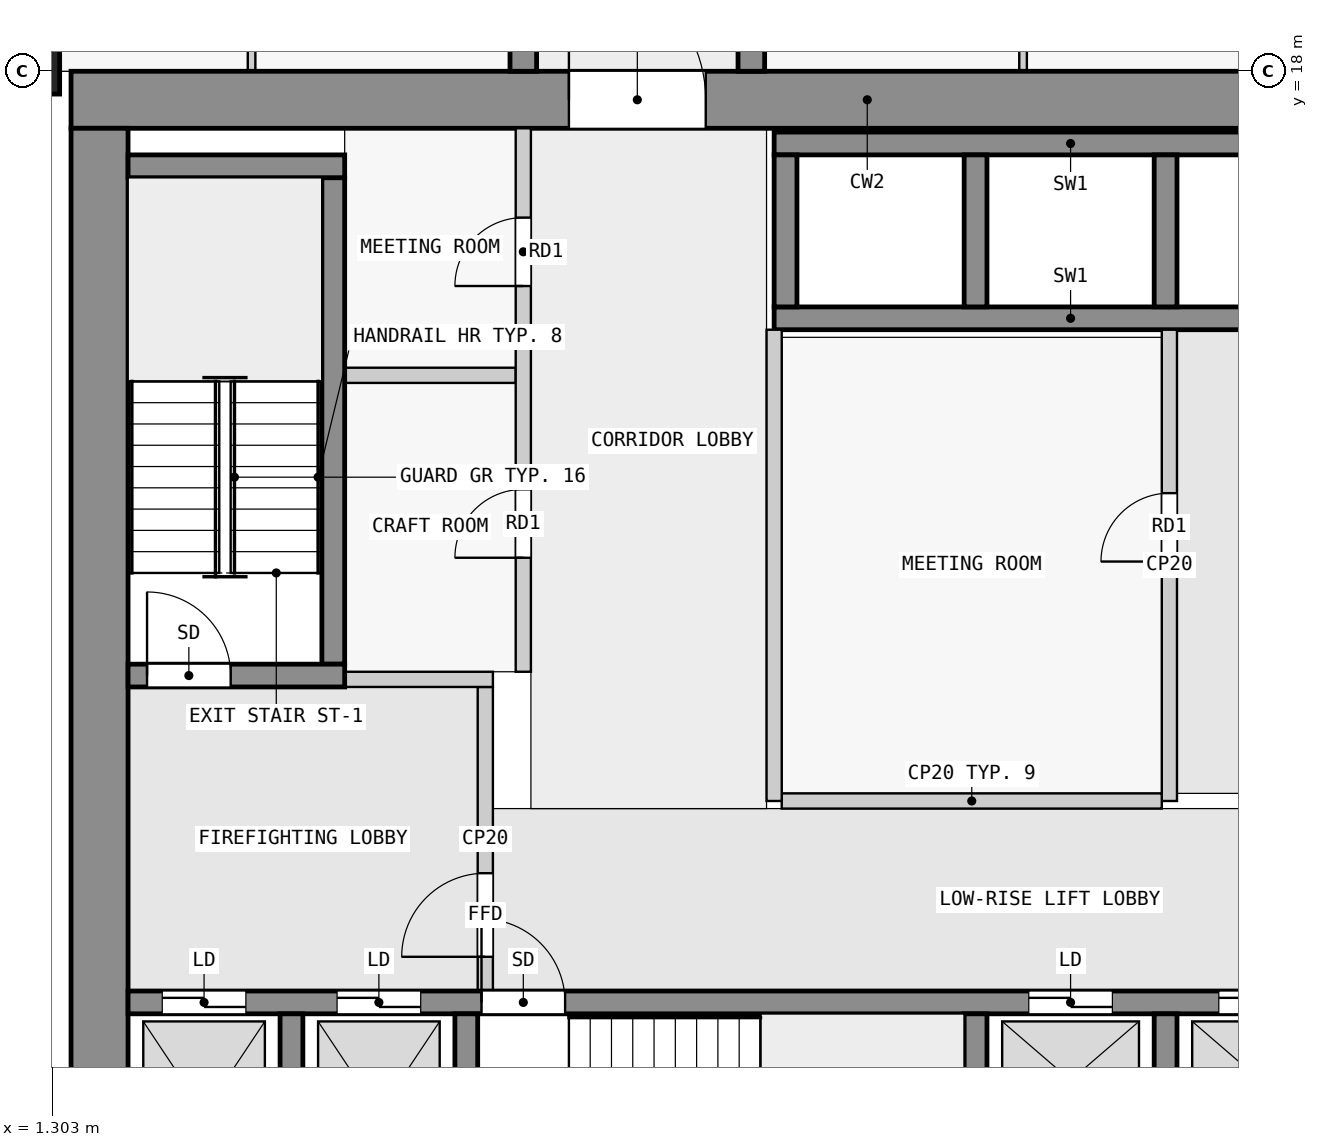
"""IFC4 building model, lengths in metres.
Left out: names, types, materials, properties, quantities, classifications, styles, units other than length and angle.
Written with IfcOpenShell. Run it as: python <this file> out.ifc"""

import sys

from ifc_helpers import new_model, si_unit, direction, frame, frame_2d, origin, origin_2d, place, context, subcontext, project, spatial, rectangle, extrude, element, fill, save


model = new_model("IFC4")
c1 = context("Model", 3, precision=1e-05, world=origin(), true_north=direction((0.0, 1.0)))
c2 = subcontext(c1, "Body", "Model", "MODEL_VIEW")
j1 = project(units=[si_unit("LENGTHUNIT", "METRE"), si_unit("PLANEANGLEUNIT", "RADIAN")], contexts=[c1])
p1 = place(None, origin())
s1 = spatial("IfcSite", under=j1, at=p1, CompositionType="ELEMENT")
p2 = place(p1, origin())
s2 = spatial("IfcBuilding", under=s1, at=p2, CompositionType="ELEMENT")
p3 = place(p2, frame((0.0, 0.0, 47.8)))
s3 = spatial("IfcBuildingStorey", under=s2, at=p3, CompositionType="ELEMENT", Elevation=47.8)
p4 = place(p3, frame((0.7, 18.0, 0.0), z_axis=(0.0, 0.0, 1.0), x_axis=(0.0, 1.0, 0.0)))
e1 = element("IfcColumn", 1, at=p4, inside=s3, PredefinedType="COLUMN", context=c2, shape_type="SweptSolid", body=[
    extrude(rectangle(XDim=0.6, YDim=1.4, at=origin_2d()), origin(), (0.0, 0.0, 1.0), 3.5),
])
p5 = place(p3, frame((1.55, 17.625, 0.0), z_axis=(0.0, 0.0, 1.0), x_axis=(1.0, 0.0, 0.0)))
e2 = element("IfcWall", 2, at=p5, inside=s3, PredefinedType="SHEAR", context=c2, shape_type="SweptSolid", body=[
    extrude(rectangle(XDim=20.95, YDim=0.75, at=frame_2d((10.475, 0.0))), origin(), (0.0, 0.0, 1.0), 3.25),
])
p6 = place(p5, frame((6.55, 0.0, 0.0)))
e3 = element("IfcOpeningElement", 3, at=p6, cuts=e2, PredefinedType="OPENING", context=c2, shape_type="SweptSolid", body=[
    extrude(rectangle(XDim=1.8, YDim=2.1, at=frame_2d((0.9, 1.05))), frame((0.0, 0.385, 0.0), z_axis=(0.0, -1.0, 0.0), x_axis=(1.0, 0.0, 0.0)), (0.0, 0.0, 1.0), 0.77),
])
p7 = place(p3, frame((1.925, 2.5, 0.0), z_axis=(0.0, 0.0, 1.0), x_axis=(0.0, 1.0, 0.0)))
e4 = element("IfcWall", 4, at=p7, inside=s3, PredefinedType="SHEAR", context=c2, shape_type="SweptSolid", body=[
    extrude(rectangle(XDim=14.75, YDim=0.75, at=frame_2d((7.375, 0.0))), origin(), (0.0, 0.0, 1.0), 3.25),
])
for number, where, z_axis, x_axis in (
    (5, (4.45, 2.8, 0.0), (0.0, 0.0, 1.0), (0.0, 1.0, 0.0)),
    (6, (6.75, 2.8, 0.0), (0.0, 0.0, 1.0), (0.0, 1.0, 0.0)),
    (7, (13.45, 2.8, 0.0), (0.0, 0.0, 1.0), (0.0, 1.0, 0.0)),
    (8, (15.95, 2.8, 0.0), (0.0, 0.0, 1.0), (0.0, 1.0, 0.0)),
):
    element("IfcWall", number, at=place(p3, frame(where, z_axis=z_axis, x_axis=x_axis)), inside=s3, PredefinedType="SHEAR", context=c2, shape_type="SweptSolid", body=[
        extrude(rectangle(XDim=2.8, YDim=0.3, at=frame_2d((1.4, 0.0))), origin(), (0.0, 0.0, 1.0), 3.25),
    ])
p8 = place(p3, frame((2.3, 5.75, 0.0), z_axis=(0.0, 0.0, 1.0), x_axis=(1.0, 0.0, 0.0)))
e9 = element("IfcWall", 9, at=p8, inside=s3, PredefinedType="SHEAR", context=c2, shape_type="SweptSolid", body=[
    extrude(rectangle(XDim=18.8, YDim=0.3, at=frame_2d((9.4, 0.0))), origin(), (0.0, 0.0, 1.0), 3.25),
])
p9 = place(p8, frame((4.65, 0.0, 0.0)))
e10 = element("IfcOpeningElement", 10, at=p9, cuts=e9, PredefinedType="OPENING", context=c2, shape_type="SweptSolid", body=[
    extrude(rectangle(XDim=1.1, YDim=2.1, at=frame_2d((0.55, 1.05))), frame((0.0, 0.16, 0.0), z_axis=(0.0, -1.0, 0.0), x_axis=(1.0, 0.0, 0.0)), (0.0, 0.0, 1.0), 0.32),
])
p10 = place(p8, frame((0.45, 0.0, 0.0)))
e11 = element("IfcOpeningElement", 11, at=p10, cuts=e9, PredefinedType="OPENING", context=c2, shape_type="SweptSolid", body=[
    extrude(rectangle(XDim=1.1, YDim=2.1, at=frame_2d((0.55, 1.05))), frame((0.0, 0.16, 0.0), z_axis=(0.0, -1.0, 0.0), x_axis=(1.0, 0.0, 0.0)), (0.0, 0.0, 1.0), 0.32),
])
p11 = place(p8, frame((2.75, 0.0, 0.0)))
e12 = element("IfcOpeningElement", 12, at=p11, cuts=e9, PredefinedType="OPENING", context=c2, shape_type="SweptSolid", body=[
    extrude(rectangle(XDim=1.1, YDim=2.1, at=frame_2d((0.55, 1.05))), frame((0.0, 0.16, 0.0), z_axis=(0.0, -1.0, 0.0), x_axis=(1.0, 0.0, 0.0)), (0.0, 0.0, 1.0), 0.32),
])
p12 = place(p8, frame((11.85, 0.0, 0.0)))
e13 = element("IfcOpeningElement", 13, at=p12, cuts=e9, PredefinedType="OPENING", context=c2, shape_type="SweptSolid", body=[
    extrude(rectangle(XDim=1.1, YDim=2.1, at=frame_2d((0.55, 1.05))), frame((0.0, 0.16, 0.0), z_axis=(0.0, -1.0, 0.0), x_axis=(1.0, 0.0, 0.0)), (0.0, 0.0, 1.0), 0.32),
])
p13 = place(p8, frame((14.35, 0.0, 0.0)))
e14 = element("IfcOpeningElement", 14, at=p13, cuts=e9, PredefinedType="OPENING", context=c2, shape_type="SweptSolid", body=[
    extrude(rectangle(XDim=1.1, YDim=2.1, at=frame_2d((0.55, 1.05))), frame((0.0, 0.16, 0.0), z_axis=(0.0, -1.0, 0.0), x_axis=(1.0, 0.0, 0.0)), (0.0, 0.0, 1.0), 0.32),
])
p14 = place(p8, frame((16.85, 0.0, 0.0)))
e15 = element("IfcOpeningElement", 15, at=p14, cuts=e9, PredefinedType="OPENING", context=c2, shape_type="SweptSolid", body=[
    extrude(rectangle(XDim=1.1, YDim=2.1, at=frame_2d((0.55, 1.05))), frame((0.0, 0.16, 0.0), z_axis=(0.0, -1.0, 0.0), x_axis=(1.0, 0.0, 0.0)), (0.0, 0.0, 1.0), 0.32),
])
p15 = place(p3, frame((2.3, 10.05, 0.0), z_axis=(0.0, 0.0, 1.0), x_axis=(1.0, 0.0, 0.0)))
e16 = element("IfcWall", 16, at=p15, inside=s3, PredefinedType="SHEAR", context=c2, shape_type="SweptSolid", body=[
    extrude(rectangle(XDim=2.85, YDim=0.3, at=frame_2d((1.425, 0.0))), origin(), (0.0, 0.0, 1.0), 3.25),
])
p16 = place(p15, frame((0.25, 0.0, 0.0)))
e17 = element("IfcOpeningElement", 17, at=p16, cuts=e16, PredefinedType="OPENING", context=c2, shape_type="SweptSolid", body=[
    extrude(rectangle(XDim=1.1, YDim=2.1, at=frame_2d((0.55, 1.05))), frame((0.0, 0.16, 0.0), z_axis=(0.0, -1.0, 0.0), x_axis=(1.0, 0.0, 0.0)), (0.0, 0.0, 1.0), 0.32),
])
p17 = place(p3, frame((5.0, 10.2, 0.0), z_axis=(0.0, 0.0, 1.0), x_axis=(0.0, 1.0, 0.0)))
e18 = element("IfcWall", 18, at=p17, inside=s3, PredefinedType="SHEAR", context=c2, shape_type="SweptSolid", body=[
    extrude(rectangle(XDim=6.4, YDim=0.3, at=frame_2d((3.2, 0.0))), origin(), (0.0, 0.0, 1.0), 3.25),
])
p18 = place(p3, frame((2.3, 16.75, 0.0), z_axis=(0.0, 0.0, 1.0), x_axis=(1.0, 0.0, 0.0)))
e19 = element("IfcWall", 19, at=p18, inside=s3, PredefinedType="SHEAR", context=c2, shape_type="SweptSolid", body=[
    extrude(rectangle(XDim=2.85, YDim=0.3, at=frame_2d((1.425, 0.0))), origin(), (0.0, 0.0, 1.0), 3.25),
])
for number, where, z_axis, x_axis in (
    (20, (10.8, 17.05, 0.0), (0.0, 0.0, 1.0), (1.0, 0.0, 0.0)),
    (21, (10.8, 14.75, 0.0), (0.0, 0.0, 1.0), (1.0, 0.0, 0.0)),
):
    element("IfcWall", number, at=place(p3, frame(where, z_axis=z_axis, x_axis=x_axis)), inside=s3, PredefinedType="SHEAR", context=c2, shape_type="SweptSolid", body=[
        extrude(rectangle(XDim=7.8, YDim=0.3, at=frame_2d((3.9, 0.0))), origin(), (0.0, 0.0, 1.0), 3.25),
    ])
for number, where, z_axis, x_axis in (
    (22, (10.95, 14.9, 0.0), (0.0, 0.0, 1.0), (0.0, 1.0, 0.0)),
    (23, (13.45, 14.9, 0.0), (0.0, 0.0, 1.0), (0.0, 1.0, 0.0)),
    (24, (15.95, 14.9, 0.0), (0.0, 0.0, 1.0), (0.0, 1.0, 0.0)),
):
    element("IfcWall", number, at=place(p3, frame(where, z_axis=z_axis, x_axis=x_axis)), inside=s3, PredefinedType="SHEAR", context=c2, shape_type="SweptSolid", body=[
        extrude(rectangle(XDim=2.0, YDim=0.3, at=frame_2d((1.0, 0.0))), origin(), (0.0, 0.0, 1.0), 3.25),
    ])
p19 = place(p3, frame((7.5, 18.0, 0.0), z_axis=(0.0, 0.0, 1.0), x_axis=(0.0, 1.0, 0.0)))
e25 = element("IfcWall", 25, at=p19, inside=s3, PredefinedType="SHEAR", context=c2, shape_type="SweptSolid", body=[
    extrude(rectangle(XDim=27.0, YDim=0.35, at=frame_2d((13.5, 0.0))), origin(), (0.0, 0.0, 1.0), 3.25),
])
p20 = place(p19, frame((4.75, 0.0, 0.0)))
e26 = element("IfcOpeningElement", 26, at=p20, cuts=e25, PredefinedType="OPENING", context=c2, shape_type="SweptSolid", body=[
    extrude(rectangle(XDim=1.0, YDim=2.1, at=frame_2d((0.5, 1.05))), frame((0.0, 0.185, 0.0), z_axis=(0.0, -1.0, 0.0), x_axis=(1.0, 0.0, 0.0)), (0.0, 0.0, 1.0), 0.37),
])
p21 = place(p19, frame((15.25, 0.0, 0.0)))
e27 = element("IfcOpeningElement", 27, at=p21, cuts=e25, PredefinedType="OPENING", context=c2, shape_type="SweptSolid", body=[
    extrude(rectangle(XDim=1.0, YDim=2.1, at=frame_2d((0.5, 1.05))), frame((0.0, 0.185, 0.0), z_axis=(0.0, -1.0, 0.0), x_axis=(1.0, 0.0, 0.0)), (0.0, 0.0, 1.0), 0.37),
])
p22 = place(p19, frame((19.75, 0.0, 0.0)))
e28 = element("IfcOpeningElement", 28, at=p22, cuts=e25, PredefinedType="OPENING", context=c2, shape_type="SweptSolid", body=[
    extrude(rectangle(XDim=1.0, YDim=2.1, at=frame_2d((0.5, 1.05))), frame((0.0, 0.185, 0.0), z_axis=(0.0, -1.0, 0.0), x_axis=(1.0, 0.0, 0.0)), (0.0, 0.0, 1.0), 0.37),
])
p23 = place(p19, frame((23.25, 0.0, 0.0)))
e29 = element("IfcOpeningElement", 29, at=p23, cuts=e25, PredefinedType="OPENING", context=c2, shape_type="SweptSolid", body=[
    extrude(rectangle(XDim=0.9, YDim=2.1, at=frame_2d((0.45, 1.05))), frame((0.0, 0.185, 0.0), z_axis=(0.0, -1.0, 0.0), x_axis=(1.0, 0.0, 0.0)), (0.0, 0.0, 1.0), 0.37),
])
p24 = place(p19, frame((25.45, 0.0, 0.0)))
e30 = element("IfcOpeningElement", 30, at=p24, cuts=e25, PredefinedType="OPENING", context=c2, shape_type="SweptSolid", body=[
    extrude(rectangle(XDim=1.0, YDim=2.1, at=frame_2d((0.5, 1.05))), frame((0.0, 0.185, 0.0), z_axis=(0.0, -1.0, 0.0), x_axis=(1.0, 0.0, 0.0)), (0.0, 0.0, 1.0), 0.37),
])
p25 = place(p3, frame((10.5, 18.0, 0.0), z_axis=(0.0, 0.0, 1.0), x_axis=(0.0, 1.0, 0.0)))
e31 = element("IfcWall", 31, at=p25, inside=s3, PredefinedType="SHEAR", context=c2, shape_type="SweptSolid", body=[
    extrude(rectangle(XDim=27.0, YDim=0.35, at=frame_2d((13.5, 0.0))), origin(), (0.0, 0.0, 1.0), 3.25),
])
p26 = place(p25, frame((1.75, 0.0, 0.0)))
e32 = element("IfcOpeningElement", 32, at=p26, cuts=e31, PredefinedType="OPENING", context=c2, shape_type="SweptSolid", body=[
    extrude(rectangle(XDim=1.0, YDim=2.1, at=frame_2d((0.5, 1.05))), frame((0.0, 0.185, 0.0), z_axis=(0.0, -1.0, 0.0), x_axis=(1.0, 0.0, 0.0)), (0.0, 0.0, 1.0), 0.37),
])
p27 = place(p25, frame((6.25, 0.0, 0.0)))
e33 = element("IfcOpeningElement", 33, at=p27, cuts=e31, PredefinedType="OPENING", context=c2, shape_type="SweptSolid", body=[
    extrude(rectangle(XDim=1.0, YDim=2.1, at=frame_2d((0.5, 1.05))), frame((0.0, 0.185, 0.0), z_axis=(0.0, -1.0, 0.0), x_axis=(1.0, 0.0, 0.0)), (0.0, 0.0, 1.0), 0.37),
])
p28 = place(p25, frame((10.75, 0.0, 0.0)))
e34 = element("IfcOpeningElement", 34, at=p28, cuts=e31, PredefinedType="OPENING", context=c2, shape_type="SweptSolid", body=[
    extrude(rectangle(XDim=1.0, YDim=2.1, at=frame_2d((0.5, 1.05))), frame((0.0, 0.185, 0.0), z_axis=(0.0, -1.0, 0.0), x_axis=(1.0, 0.0, 0.0)), (0.0, 0.0, 1.0), 0.37),
])
p29 = place(p25, frame((15.25, 0.0, 0.0)))
e35 = element("IfcOpeningElement", 35, at=p29, cuts=e31, PredefinedType="OPENING", context=c2, shape_type="SweptSolid", body=[
    extrude(rectangle(XDim=1.0, YDim=2.1, at=frame_2d((0.5, 1.05))), frame((0.0, 0.185, 0.0), z_axis=(0.0, -1.0, 0.0), x_axis=(1.0, 0.0, 0.0)), (0.0, 0.0, 1.0), 0.37),
])
p30 = place(p25, frame((21.35, 0.0, 0.0)))
e36 = element("IfcOpeningElement", 36, at=p30, cuts=e31, PredefinedType="OPENING", context=c2, shape_type="SweptSolid", body=[
    extrude(rectangle(XDim=1.0, YDim=2.1, at=frame_2d((0.5, 1.05))), frame((0.0, 0.185, 0.0), z_axis=(0.0, -1.0, 0.0), x_axis=(1.0, 0.0, 0.0)), (0.0, 0.0, 1.0), 0.37),
])
p31 = place(p3, frame((7.0, 5.9, 0.0), z_axis=(0.0, 0.0, 1.0), x_axis=(0.0, 1.0, 0.0)))
e37 = element("IfcWall", 37, at=p31, inside=s3, PredefinedType="PARTITIONING", context=c2, shape_type="SweptSolid", body=[
    extrude(rectangle(XDim=4.0, YDim=0.2, at=frame_2d((2.0, 0.0))), origin(), (0.0, 0.0, 1.0), 3.25),
])
p32 = place(p31, frame((0.45, 0.0, 0.0)))
e38 = element("IfcOpeningElement", 38, at=p32, cuts=e37, PredefinedType="OPENING", context=c2, shape_type="SweptSolid", body=[
    extrude(rectangle(XDim=1.1, YDim=2.1, at=frame_2d((0.55, 1.05))), frame((0.0, 0.11, 0.0), z_axis=(0.0, -1.0, 0.0), x_axis=(1.0, 0.0, 0.0)), (0.0, 0.0, 1.0), 0.22),
])
p33 = place(p3, frame((5.15, 10.0, 0.0), z_axis=(0.0, 0.0, 1.0), x_axis=(1.0, 0.0, 0.0)))
e39 = element("IfcWall", 39, at=p33, inside=s3, PredefinedType="PARTITIONING", context=c2, shape_type="SweptSolid", body=[
    extrude(rectangle(XDim=1.95, YDim=0.2, at=frame_2d((0.975, 0.0))), origin(), (0.0, 0.0, 1.0), 3.25),
])
p34 = place(p3, frame((10.8, 8.4, 0.0), z_axis=(0.0, 0.0, 1.0), x_axis=(0.0, 1.0, 0.0)))
e40 = element("IfcWall", 40, at=p34, inside=s3, PredefinedType="PARTITIONING", context=c2, shape_type="SweptSolid", body=[
    extrude(rectangle(XDim=6.2, YDim=0.2, at=frame_2d((3.1, 0.0))), origin(), (0.0, 0.0, 1.0), 3.25),
])
p35 = place(p3, frame((10.9, 8.4, 0.0), z_axis=(0.0, 0.0, 1.0), x_axis=(1.0, 0.0, 0.0)))
e41 = element("IfcWall", 41, at=p35, inside=s3, PredefinedType="PARTITIONING", context=c2, shape_type="SweptSolid", body=[
    extrude(rectangle(XDim=5.0, YDim=0.2, at=frame_2d((2.5, 0.0))), origin(), (0.0, 0.0, 1.0), 3.25),
])
p36 = place(p3, frame((16.0, 8.4, 0.0), z_axis=(0.0, 0.0, 1.0), x_axis=(0.0, 1.0, 0.0)))
e42 = element("IfcWall", 42, at=p36, inside=s3, PredefinedType="PARTITIONING", context=c2, shape_type="SweptSolid", body=[
    extrude(rectangle(XDim=6.2, YDim=0.2, at=frame_2d((3.1, 0.0))), origin(), (0.0, 0.0, 1.0), 3.25),
])
p37 = place(p36, frame((3.15, 0.0, 0.0)))
e43 = element("IfcOpeningElement", 43, at=p37, cuts=e42, PredefinedType="OPENING", context=c2, shape_type="SweptSolid", body=[
    extrude(rectangle(XDim=0.9, YDim=2.1, at=frame_2d((0.45, 1.05))), frame((0.0, 0.11, 0.0), z_axis=(0.0, -1.0, 0.0), x_axis=(1.0, 0.0, 0.0)), (0.0, 0.0, 1.0), 0.22),
])
p38 = place(p3, frame((7.5, 10.1, 0.0), z_axis=(0.0, 0.0, 1.0), x_axis=(0.0, 1.0, 0.0)))
e44 = element("IfcWall", 44, at=p38, inside=s3, PredefinedType="PARTITIONING", context=c2, shape_type="SweptSolid", body=[
    extrude(rectangle(XDim=7.15, YDim=0.2, at=frame_2d((3.575, 0.0))), origin(), (0.0, 0.0, 1.0), 3.25),
])
p39 = place(p38, frame((1.5, 0.0, 0.0)))
e45 = element("IfcOpeningElement", 45, at=p39, cuts=e44, PredefinedType="OPENING", context=c2, shape_type="SweptSolid", body=[
    extrude(rectangle(XDim=0.9, YDim=2.1, at=frame_2d((0.45, 1.05))), frame((0.0, 0.11, 0.0), z_axis=(0.0, -1.0, 0.0), x_axis=(1.0, 0.0, 0.0)), (0.0, 0.0, 1.0), 0.22),
])
p40 = place(p38, frame((5.075, 0.0, 0.0)))
e46 = element("IfcOpeningElement", 46, at=p40, cuts=e44, PredefinedType="OPENING", context=c2, shape_type="SweptSolid", body=[
    extrude(rectangle(XDim=0.9, YDim=2.1, at=frame_2d((0.45, 1.05))), frame((0.0, 0.11, 0.0), z_axis=(0.0, -1.0, 0.0), x_axis=(1.0, 0.0, 0.0)), (0.0, 0.0, 1.0), 0.22),
])
p41 = place(p3, frame((5.15, 14.0, 0.0), z_axis=(0.0, 0.0, 1.0), x_axis=(1.0, 0.0, 0.0)))
e47 = element("IfcWall", 47, at=p41, inside=s3, PredefinedType="PARTITIONING", context=c2, shape_type="SweptSolid", body=[
    extrude(rectangle(XDim=2.25, YDim=0.2, at=frame_2d((1.125, 0.0))), origin(), (0.0, 0.0, 1.0), 3.25),
])
p42 = place(p3, frame((3.925, 18.0, 0.0), z_axis=(0.0, 0.0, 1.0), x_axis=(0.0, 1.0, 0.0)))
e48 = element("IfcWall", 48, at=p42, inside=s3, PredefinedType="PARTITIONING", context=c2, shape_type="SweptSolid", body=[
    extrude(rectangle(XDim=9.0, YDim=0.1, at=frame_2d((4.5, 0.0))), origin(), (0.0, 0.0, 1.0), 3.25),
])
p43 = place(p42, frame((1.85, 0.0, 0.0)))
e49 = element("IfcOpeningElement", 49, at=p43, cuts=e48, PredefinedType="OPENING", context=c2, shape_type="SweptSolid", body=[
    extrude(rectangle(XDim=0.9, YDim=2.1, at=frame_2d((0.45, 1.05))), frame((0.0, 0.06, 0.0), z_axis=(0.0, -1.0, 0.0), x_axis=(1.0, 0.0, 0.0)), (0.0, 0.0, 1.0), 0.12),
])
p44 = place(p42, frame((6.25, 0.0, 0.0)))
e50 = element("IfcOpeningElement", 50, at=p44, cuts=e48, PredefinedType="OPENING", context=c2, shape_type="SweptSolid", body=[
    extrude(rectangle(XDim=0.9, YDim=2.1, at=frame_2d((0.45, 1.05))), frame((0.0, 0.06, 0.0), z_axis=(0.0, -1.0, 0.0), x_axis=(1.0, 0.0, 0.0)), (0.0, 0.0, 1.0), 0.12),
])
p45 = place(p3, frame((14.075, 18.0, 0.0), z_axis=(0.0, 0.0, 1.0), x_axis=(0.0, 1.0, 0.0)))
e51 = element("IfcWall", 51, at=p45, inside=s3, PredefinedType="PARTITIONING", context=c2, shape_type="SweptSolid", body=[
    extrude(rectangle(XDim=1.45, YDim=0.1, at=frame_2d((0.725, 0.0))), origin(), (0.0, 0.0, 1.0), 3.25),
])
p46 = place(p32, origin())
e52 = element("IfcDoor", 52, at=p46, inside=s3, OperationType="SINGLE_SWING_LEFT", PredefinedType="DOOR", context=c2, shape_type="SweptSolid", body=[
    extrude(rectangle(XDim=1.1, YDim=2.1, at=frame_2d((0.55, 1.05))), frame((0.0, 0.025, 0.0), z_axis=(0.0, -1.0, 0.0), x_axis=(1.0, 0.0, 0.0)), (0.0, 0.0, 1.0), 0.05),
])
fill(e38, e52)
p47 = place(p16, origin())
e53 = element("IfcDoor", 53, at=p47, inside=s3, OperationType="SINGLE_SWING_RIGHT", PredefinedType="DOOR", context=c2, shape_type="SweptSolid", body=[
    extrude(rectangle(XDim=1.1, YDim=2.1, at=frame_2d((0.55, 1.05))), frame((0.0, 0.025, 0.0), z_axis=(0.0, -1.0, 0.0), x_axis=(1.0, 0.0, 0.0)), (0.0, 0.0, 1.0), 0.05),
])
fill(e17, e53)
p48 = place(p37, origin())
e54 = element("IfcDoor", 54, at=p48, inside=s3, OperationType="SINGLE_SWING_LEFT", PredefinedType="DOOR", context=c2, shape_type="SweptSolid", body=[
    extrude(rectangle(XDim=0.9, YDim=2.1, at=frame_2d((0.45, 1.05))), frame((0.0, 0.025, 0.0), z_axis=(0.0, -1.0, 0.0), x_axis=(1.0, 0.0, 0.0)), (0.0, 0.0, 1.0), 0.05),
])
fill(e43, e54)
p49 = place(p9, origin())
e55 = element("IfcDoor", 55, at=p49, inside=s3, OperationType="SINGLE_SWING_LEFT", PredefinedType="DOOR", context=c2, shape_type="SweptSolid", body=[
    extrude(rectangle(XDim=1.1, YDim=2.1, at=frame_2d((0.55, 1.05))), frame((0.0, 0.025, 0.0), z_axis=(0.0, -1.0, 0.0), x_axis=(1.0, 0.0, 0.0)), (0.0, 0.0, 1.0), 0.05),
])
fill(e10, e55)
p50 = place(p10, origin())
e56 = element("IfcDoor", 56, at=p50, inside=s3, OperationType="DOUBLE_DOOR_SLIDING", PredefinedType="DOOR", context=c2, shape_type="SweptSolid", body=[
    extrude(rectangle(XDim=1.1, YDim=2.1, at=frame_2d((0.55, 1.05))), frame((0.0, 0.025, 0.0), z_axis=(0.0, -1.0, 0.0), x_axis=(1.0, 0.0, 0.0)), (0.0, 0.0, 1.0), 0.05),
])
fill(e11, e56)
p51 = place(p11, origin())
e57 = element("IfcDoor", 57, at=p51, inside=s3, OperationType="DOUBLE_DOOR_SLIDING", PredefinedType="DOOR", context=c2, shape_type="SweptSolid", body=[
    extrude(rectangle(XDim=1.1, YDim=2.1, at=frame_2d((0.55, 1.05))), frame((0.0, 0.025, 0.0), z_axis=(0.0, -1.0, 0.0), x_axis=(1.0, 0.0, 0.0)), (0.0, 0.0, 1.0), 0.05),
])
fill(e12, e57)
p52 = place(p12, origin())
e58 = element("IfcDoor", 58, at=p52, inside=s3, OperationType="DOUBLE_DOOR_SLIDING", PredefinedType="DOOR", context=c2, shape_type="SweptSolid", body=[
    extrude(rectangle(XDim=1.1, YDim=2.1, at=frame_2d((0.55, 1.05))), frame((0.0, 0.025, 0.0), z_axis=(0.0, -1.0, 0.0), x_axis=(1.0, 0.0, 0.0)), (0.0, 0.0, 1.0), 0.05),
])
fill(e13, e58)
p53 = place(p13, origin())
e59 = element("IfcDoor", 59, at=p53, inside=s3, OperationType="DOUBLE_DOOR_SLIDING", PredefinedType="DOOR", context=c2, shape_type="SweptSolid", body=[
    extrude(rectangle(XDim=1.1, YDim=2.1, at=frame_2d((0.55, 1.05))), frame((0.0, 0.025, 0.0), z_axis=(0.0, -1.0, 0.0), x_axis=(1.0, 0.0, 0.0)), (0.0, 0.0, 1.0), 0.05),
])
fill(e14, e59)
p54 = place(p6, origin())
e60 = element("IfcDoor", 60, at=p54, inside=s3, OperationType="DOUBLE_DOOR_SINGLE_SWING", PredefinedType="DOOR", context=c2, shape_type="SweptSolid", body=[
    extrude(rectangle(XDim=1.8, YDim=2.1, at=frame_2d((0.9, 1.05))), frame((0.0, 0.025, 0.0), z_axis=(0.0, -1.0, 0.0), x_axis=(1.0, 0.0, 0.0)), (0.0, 0.0, 1.0), 0.05),
])
fill(e3, e60)
p55 = place(p39, origin())
e61 = element("IfcDoor", 61, at=p55, inside=s3, OperationType="SINGLE_SWING_RIGHT", PredefinedType="DOOR", context=c2, shape_type="SweptSolid", body=[
    extrude(rectangle(XDim=0.9, YDim=2.1, at=frame_2d((0.45, 1.05))), frame((0.0, 0.025, 0.0), z_axis=(0.0, -1.0, 0.0), x_axis=(1.0, 0.0, 0.0)), (0.0, 0.0, 1.0), 0.05),
])
fill(e45, e61)
p56 = place(p40, origin())
e62 = element("IfcDoor", 62, at=p56, inside=s3, OperationType="SINGLE_SWING_RIGHT", PredefinedType="DOOR", context=c2, shape_type="SweptSolid", body=[
    extrude(rectangle(XDim=0.9, YDim=2.1, at=frame_2d((0.45, 1.05))), frame((0.0, 0.025, 0.0), z_axis=(0.0, -1.0, 0.0), x_axis=(1.0, 0.0, 0.0)), (0.0, 0.0, 1.0), 0.05),
])
fill(e46, e62)
save(model, sys.argv[1])
